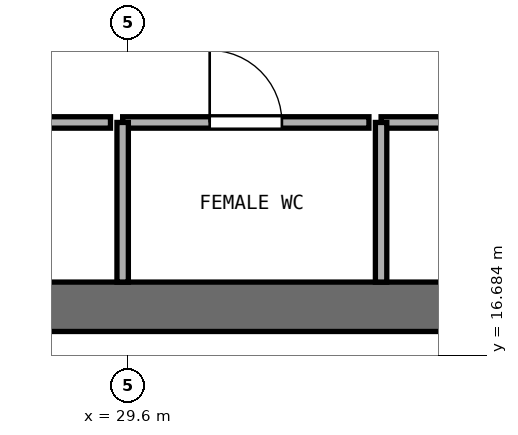
"""IFC4 building model, lengths in metres.
Left out: names, types, materials, properties, quantities, classifications, styles, units other than length and angle.
Written with IfcOpenShell. Run it as: python <this file> out.ifc"""

import sys

from ifc_helpers import new_model, si_unit, direction, frame, frame_2d, origin, place, context, subcontext, project, spatial, rectangle, extrude, element, fill, save


model = new_model("IFC4")
c1 = context("Model", 3, precision=1e-05, world=origin(), true_north=direction((0.0, 1.0)))
c2 = subcontext(c1, "Body", "Model", "MODEL_VIEW")
j1 = project(units=[si_unit("LENGTHUNIT", "METRE"), si_unit("PLANEANGLEUNIT", "RADIAN")], contexts=[c1])
p1 = place(None, origin())
s1 = spatial("IfcSite", under=j1, at=p1, CompositionType="ELEMENT")
p2 = place(p1, origin())
s2 = spatial("IfcBuilding", under=s1, at=p2, CompositionType="ELEMENT")
p3 = place(p2, frame((0.0, 0.0, 70.6)))
s3 = spatial("IfcBuildingStorey", under=s2, at=p3, CompositionType="ELEMENT", Elevation=70.6)
p4 = place(p3, frame((25.4, 17.325, 0.0), z_axis=(0.0, 0.0, 1.0), x_axis=(1.0, 0.0, 0.0)))
e1 = element("IfcWall", 1, at=p4, inside=s3, PredefinedType="SHEAR", context=c2, shape_type="SweptSolid", body=[
    extrude(rectangle(XDim=23.2, YDim=0.65, at=frame_2d((11.6, 0.0))), origin(), (0.0, 0.0, 1.0), 3.525),
])
p5 = place(p3, frame((26.17, 19.75, 0.0), z_axis=(0.0, 0.0, 1.0), x_axis=(1.0, 0.0, 0.0)))
e2 = element("IfcWall", 2, at=p5, inside=s3, PredefinedType="PARTITIONING", context=c2, shape_type="SweptSolid", body=[
    extrude(rectangle(XDim=3.2, YDim=0.15, at=frame_2d((1.6, 0.0))), origin(), (0.0, 0.0, 1.0), 3.525),
])
p6 = place(p5, frame((1.125, 0.0, 0.0)))
e3 = element("IfcOpeningElement", 3, at=p6, cuts=e2, PredefinedType="OPENING", context=c2, shape_type="SweptSolid", body=[
    extrude(rectangle(XDim=0.95, YDim=2.1, at=frame_2d((0.475, 1.05))), frame((0.0, 0.085, 0.0), z_axis=(0.0, -1.0, 0.0), x_axis=(1.0, 0.0, 0.0)), (0.0, 0.0, 1.0), 0.17),
])
p7 = place(p3, frame((29.53, 19.75, 0.0), z_axis=(0.0, 0.0, 1.0), x_axis=(1.0, 0.0, 0.0)))
e4 = element("IfcWall", 4, at=p7, inside=s3, PredefinedType="PARTITIONING", context=c2, shape_type="SweptSolid", body=[
    extrude(rectangle(XDim=3.24, YDim=0.15, at=frame_2d((1.62, 0.0))), origin(), (0.0, 0.0, 1.0), 3.525),
])
p8 = place(p7, frame((1.145, 0.0, 0.0)))
e5 = element("IfcOpeningElement", 5, at=p8, cuts=e4, PredefinedType="OPENING", context=c2, shape_type="SweptSolid", body=[
    extrude(rectangle(XDim=0.95, YDim=2.1, at=frame_2d((0.475, 1.05))), frame((0.0, 0.085, 0.0), z_axis=(0.0, -1.0, 0.0), x_axis=(1.0, 0.0, 0.0)), (0.0, 0.0, 1.0), 0.17),
])
p9 = place(p3, frame((29.53, 17.65, 0.0), z_axis=(0.0, 0.0, 1.0), x_axis=(0.0, 1.0, 0.0)))
e6 = element("IfcWall", 6, at=p9, inside=s3, PredefinedType="PARTITIONING", context=c2, shape_type="SweptSolid", body=[
    extrude(rectangle(XDim=2.1, YDim=0.15, at=frame_2d((1.05, 0.0))), origin(), (0.0, 0.0, 1.0), 3.525),
])
p10 = place(p3, frame((32.93, 19.75, 0.0), z_axis=(0.0, 0.0, 1.0), x_axis=(1.0, 0.0, 0.0)))
e7 = element("IfcWall", 7, at=p10, inside=s3, PredefinedType="PARTITIONING", context=c2, shape_type="SweptSolid", body=[
    extrude(rectangle(XDim=3.92, YDim=0.15, at=frame_2d((1.96, 0.0))), origin(), (0.0, 0.0, 1.0), 3.525),
])
p11 = place(p10, frame((1.51, 0.0, 0.0)))
e8 = element("IfcOpeningElement", 8, at=p11, cuts=e7, PredefinedType="OPENING", context=c2, shape_type="SweptSolid", body=[
    extrude(rectangle(XDim=0.9, YDim=2.1, at=frame_2d((0.45, 1.05))), frame((0.0, 0.085, 0.0), z_axis=(0.0, -1.0, 0.0), x_axis=(1.0, 0.0, 0.0)), (0.0, 0.0, 1.0), 0.17),
])
p12 = place(p3, frame((32.93, 17.65, 0.0), z_axis=(0.0, 0.0, 1.0), x_axis=(0.0, 1.0, 0.0)))
e9 = element("IfcWall", 9, at=p12, inside=s3, PredefinedType="PARTITIONING", context=c2, shape_type="SweptSolid", body=[
    extrude(rectangle(XDim=2.1, YDim=0.15, at=frame_2d((1.05, 0.0))), origin(), (0.0, 0.0, 1.0), 3.525),
])
p13 = place(p8, origin())
e10 = element("IfcDoor", 10, at=p13, inside=s3, OperationType="SINGLE_SWING_LEFT", PredefinedType="DOOR", context=c2, shape_type="SweptSolid", body=[
    extrude(rectangle(XDim=0.95, YDim=2.1, at=frame_2d((0.475, 1.05))), frame((0.0, 0.025, 0.0), z_axis=(0.0, -1.0, 0.0), x_axis=(1.0, 0.0, 0.0)), (0.0, 0.0, 1.0), 0.05),
])
fill(e5, e10)
save(model, sys.argv[1])
